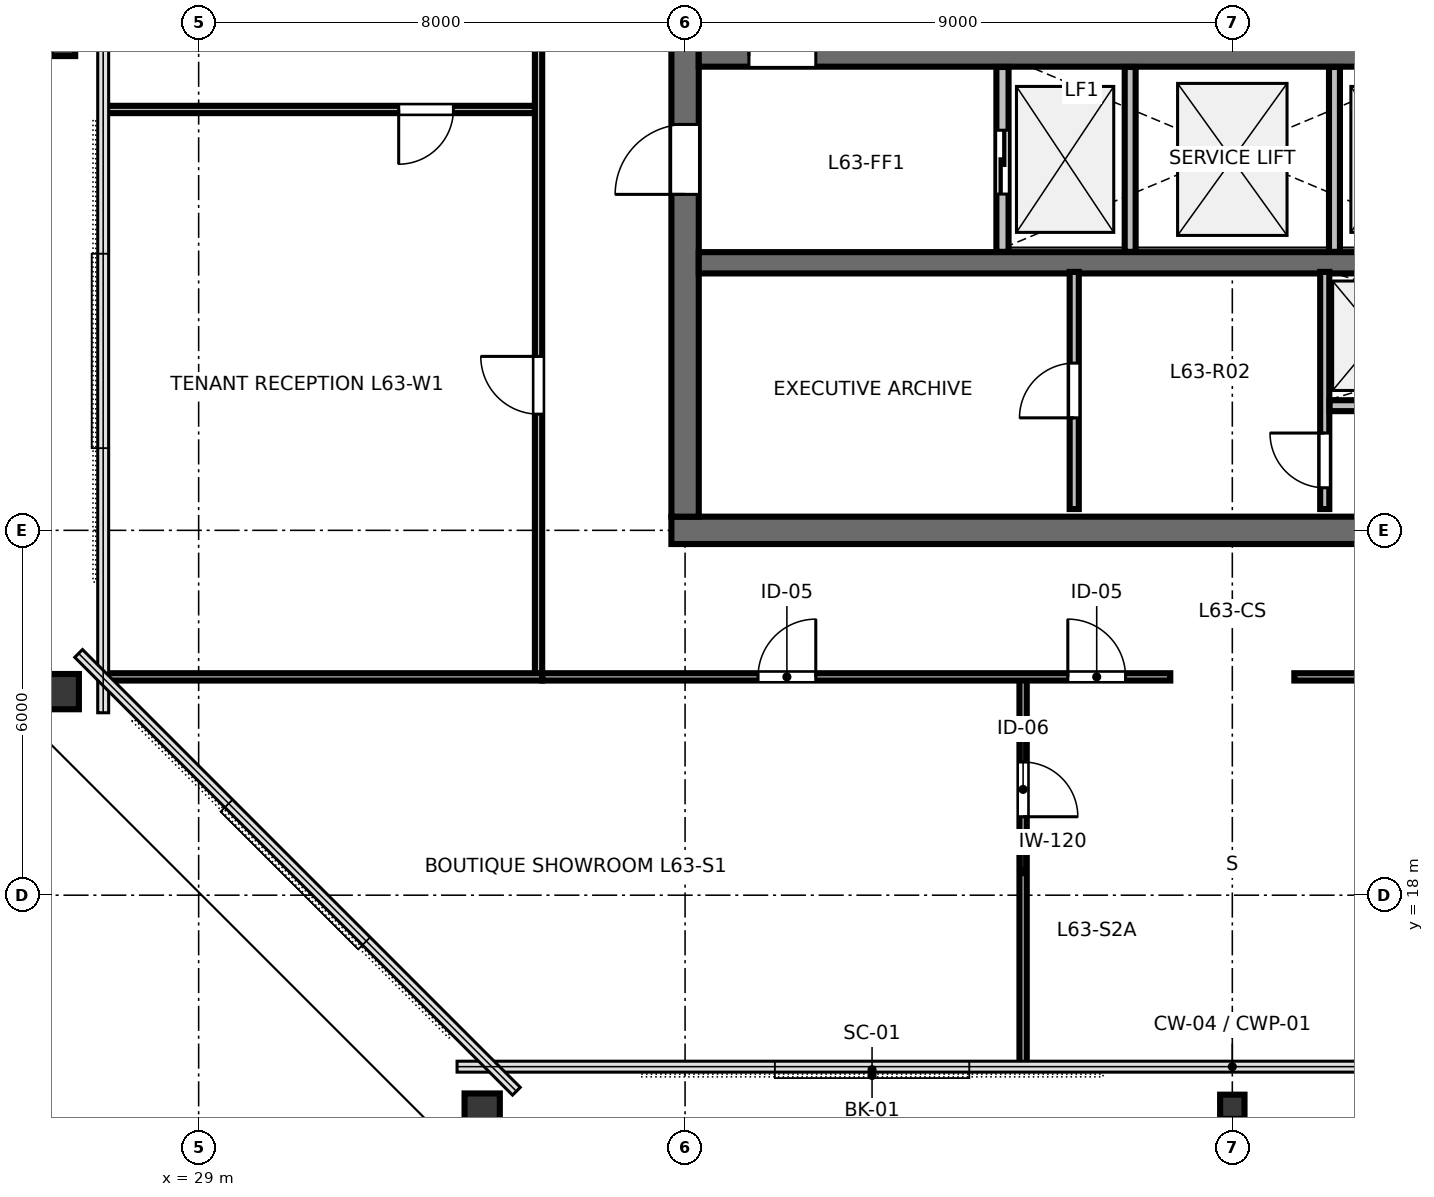
"""IFC4 building model, lengths in metres.
Left out: names, types, materials, properties, quantities, classifications, styles, units other than length and angle.
Written with IfcOpenShell. Run it as: python <this file> out.ifc"""

import sys

from ifc_helpers import new_model, si_unit, direction, frame, frame_2d, origin, origin_2d, place, context, subcontext, project, spatial, rectangle, hollow_rectangle, i_section, extrude, element, fill, save


model = new_model("IFC4")
c1 = context("Model", 3, precision=1e-05, world=origin(), true_north=direction((0.0, 1.0)))
c2 = subcontext(c1, "Body", "Model", "MODEL_VIEW")
j1 = project(units=[si_unit("LENGTHUNIT", "METRE"), si_unit("PLANEANGLEUNIT", "RADIAN")], contexts=[c1])
p1 = place(None, origin())
s1 = spatial("IfcSite", under=j1, at=p1, CompositionType="ELEMENT")
p2 = place(p1, origin())
s2 = spatial("IfcBuilding", under=s1, at=p2, CompositionType="ELEMENT")
p3 = place(p2, frame((0.0, 0.0, 239.4)))
s3 = spatial("IfcBuildingStorey", under=s2, at=p3, CompositionType="ELEMENT", Elevation=239.4)
p4 = place(p3, frame((36.775, 24.0, 0.0), z_axis=(0.0, 0.0, 1.0), x_axis=(1.0, 0.0, 0.0)))
e1 = element("IfcWall", 1, at=p4, inside=s3, PredefinedType="SHEAR", context=c2, shape_type="SweptSolid", body=[
    extrude(rectangle(XDim=18.45, YDim=0.45, at=frame_2d((9.225, 0.0))), origin(), (0.0, 0.0, 1.0), 3.36),
])
p5 = place(p4, frame((13.425, 0.0, 0.0)))
e2 = element("IfcOpeningElement", 2, at=p5, cuts=e1, PredefinedType="OPENING", context=c2, shape_type="SweptSolid", body=[
    extrude(rectangle(XDim=1.6, YDim=2.15, at=frame_2d((0.8, 1.075))), frame((0.0, 0.235, 0.0), z_axis=(0.0, -1.0, 0.0), x_axis=(1.0, 0.0, 0.0)), (0.0, 0.0, 1.0), 0.47),
])
p6 = place(p3, frame((37.0, 24.225, 0.0), z_axis=(0.0, 0.0, 1.0), x_axis=(0.0, 1.0, 0.0)))
e3 = element("IfcWall", 3, at=p6, inside=s3, PredefinedType="SHEAR", context=c2, shape_type="SweptSolid", body=[
    extrude(rectangle(XDim=15.55, YDim=0.45, at=frame_2d((7.775, 0.0))), origin(), (0.0, 0.0, 1.0), 3.36),
])
p7 = place(p6, frame((5.3, 0.0, 0.0)))
e4 = element("IfcOpeningElement", 4, at=p7, cuts=e3, PredefinedType="OPENING", context=c2, shape_type="SweptSolid", body=[
    extrude(rectangle(XDim=1.15, YDim=2.15, at=frame_2d((0.575, 1.075))), frame((0.0, 0.235, 0.0), z_axis=(0.0, -1.0, 0.0), x_axis=(1.0, 0.0, 0.0)), (0.0, 0.0, 1.0), 0.47),
])
p8 = place(p3, frame((37.225, 31.8, 0.0), z_axis=(0.0, 0.0, 1.0), x_axis=(1.0, 0.0, 0.0)))
e5 = element("IfcWall", 5, at=p8, inside=s3, PredefinedType="SHEAR", context=c2, shape_type="SweptSolid", body=[
    extrude(rectangle(XDim=17.55, YDim=0.35, at=frame_2d((8.775, 0.0))), origin(), (0.0, 0.0, 1.0), 3.36),
])
p9 = place(p8, frame((0.825, 0.0, 0.0)))
e6 = element("IfcOpeningElement", 6, at=p9, cuts=e5, PredefinedType="OPENING", context=c2, shape_type="SweptSolid", body=[
    extrude(rectangle(XDim=1.1, YDim=2.15, at=frame_2d((0.55, 1.075))), frame((0.0, 0.185, 0.0), z_axis=(0.0, -1.0, 0.0), x_axis=(1.0, 0.0, 0.0)), (0.0, 0.0, 1.0), 0.37),
])
p10 = place(p8, frame((14.725, 0.0, 0.0)))
e7 = element("IfcOpeningElement", 7, at=p10, cuts=e5, PredefinedType="OPENING", context=c2, shape_type="SweptSolid", body=[
    extrude(rectangle(XDim=1.1, YDim=2.15, at=frame_2d((0.55, 1.075))), frame((0.0, 0.185, 0.0), z_axis=(0.0, -1.0, 0.0), x_axis=(1.0, 0.0, 0.0)), (0.0, 0.0, 1.0), 0.37),
])
p11 = place(p3, frame((37.225, 28.4, 0.0), z_axis=(0.0, 0.0, 1.0), x_axis=(1.0, 0.0, 0.0)))
e8 = element("IfcWall", 8, at=p11, inside=s3, PredefinedType="SHEAR", context=c2, shape_type="SweptSolid", body=[
    extrude(rectangle(XDim=17.55, YDim=0.35, at=frame_2d((8.775, 0.0))), origin(), (0.0, 0.0, 1.0), 3.36),
])
p12 = place(p3, frame((33.663, 14.39, 0.0), z_axis=(0.0, 0.0, 1.0), x_axis=(1.0, 0.0, 0.0)))
e9 = element("IfcColumn", 9, at=p12, inside=s3, PredefinedType="COLUMN", context=c2, shape_type="SweptSolid", body=[
    extrude(hollow_rectangle(XDim=0.58, YDim=0.7, WallThickness=0.032, at=origin_2d()), origin(), (0.0, 0.0, 1.0), 3.373),
])
for number, where, z_axis, x_axis in (
    (10, (46.0, 14.52, 0.0), (0.0, 0.0, 1.0), (1.0, 0.0, 0.0)),
    (11, (26.77, 32.0, 0.0), (0.0, 0.0, 1.0), (0.0, 1.0, 0.0)),
):
    element("IfcColumn", number, at=place(p3, frame(where, z_axis=z_axis, x_axis=x_axis)), inside=s3, PredefinedType="COLUMN", context=c2, shape_type="SweptSolid", body=[
        extrude(i_section(OverallWidth=0.401, OverallDepth=0.399, WebThickness=0.025, FlangeThickness=0.04, FilletRadius=0.025, at=origin_2d()), origin(), (0.0, 0.0, 1.0), 3.373),
    ])
p13 = place(p3, frame((26.68, 21.348, 0.0), z_axis=(0.0, 0.0, 1.0), x_axis=(0.0, 1.0, 0.0)))
e12 = element("IfcColumn", 12, at=p13, inside=s3, PredefinedType="COLUMN", context=c2, shape_type="SweptSolid", body=[
    extrude(hollow_rectangle(XDim=0.58, YDim=0.7, WallThickness=0.032, at=origin_2d()), origin(), (0.0, 0.0, 1.0), 3.373),
])
p14 = place(p3, frame((42.22, 28.58, 0.0), z_axis=(0.0, 0.0, 1.0), x_axis=(0.0, 1.0, 0.0)))
e13 = element("IfcWall", 13, at=p14, inside=s3, PredefinedType="PARTITIONING", context=c2, shape_type="SweptSolid", body=[
    extrude(rectangle(XDim=3.04, YDim=0.2, at=frame_2d((1.52, 0.0))), origin(), (0.0, 0.0, 1.0), 3.375),
])
p15 = place(p14, frame((0.95, 0.0, 0.0)))
e14 = element("IfcOpeningElement", 14, at=p15, cuts=e13, PredefinedType="OPENING", context=c2, shape_type="SweptSolid", body=[
    extrude(rectangle(XDim=1.05, YDim=2.15, at=frame_2d((0.525, 1.075))), frame((0.0, 0.11, 0.0), z_axis=(0.0, -1.0, 0.0), x_axis=(1.0, 0.0, 0.0)), (0.0, 0.0, 1.0), 0.22),
])
for number, where, z_axis, x_axis in (
    (15, (44.32, 28.58, 0.0), (0.0, 0.0, 1.0), (0.0, 1.0, 0.0)),
    (16, (47.68, 28.58, 0.0), (0.0, 0.0, 1.0), (0.0, 1.0, 0.0)),
):
    element("IfcWall", number, at=place(p3, frame(where, z_axis=z_axis, x_axis=x_axis)), inside=s3, PredefinedType="PARTITIONING", context=c2, shape_type="SweptSolid", body=[
        extrude(rectangle(XDim=3.04, YDim=0.18, at=frame_2d((1.52, 0.0))), origin(), (0.0, 0.0, 1.0), 3.375),
    ])
p16 = place(p3, frame((43.4, 24.35, 0.0), z_axis=(0.0, 0.0, 1.0), x_axis=(0.0, 1.0, 0.0)))
e17 = element("IfcWall", 17, at=p16, inside=s3, PredefinedType="PARTITIONING", context=c2, shape_type="SweptSolid", body=[
    extrude(rectangle(XDim=3.9, YDim=0.15, at=frame_2d((1.95, 0.0))), origin(), (0.0, 0.0, 1.0), 3.375),
])
p17 = place(p16, frame((1.5, 0.0, 0.0)))
e18 = element("IfcOpeningElement", 18, at=p17, cuts=e17, PredefinedType="OPENING", context=c2, shape_type="SweptSolid", body=[
    extrude(rectangle(XDim=0.9, YDim=2.15, at=frame_2d((0.45, 1.075))), frame((0.0, 0.085, 0.0), z_axis=(0.0, -1.0, 0.0), x_axis=(1.0, 0.0, 0.0)), (0.0, 0.0, 1.0), 0.17),
])
p18 = place(p3, frame((47.52, 24.35, 0.0), z_axis=(0.0, 0.0, 1.0), x_axis=(0.0, 1.0, 0.0)))
e19 = element("IfcWall", 19, at=p18, inside=s3, PredefinedType="PARTITIONING", context=c2, shape_type="SweptSolid", body=[
    extrude(rectangle(XDim=3.9, YDim=0.15, at=frame_2d((1.95, 0.0))), origin(), (0.0, 0.0, 1.0), 3.375),
])
p19 = place(p18, frame((0.35, 0.0, 0.0)))
e20 = element("IfcOpeningElement", 20, at=p19, cuts=e19, PredefinedType="OPENING", context=c2, shape_type="SweptSolid", body=[
    extrude(rectangle(XDim=0.9, YDim=2.15, at=frame_2d((0.45, 1.075))), frame((0.0, 0.085, 0.0), z_axis=(0.0, -1.0, 0.0), x_axis=(1.0, 0.0, 0.0)), (0.0, 0.0, 1.0), 0.17),
])
p20 = place(p3, frame((47.6, 26.05, 0.0), z_axis=(0.0, 0.0, 1.0), x_axis=(1.0, 0.0, 0.0)))
e21 = element("IfcWall", 21, at=p20, inside=s3, PredefinedType="PARTITIONING", context=c2, shape_type="SweptSolid", body=[
    extrude(rectangle(XDim=7.0, YDim=0.18, at=frame_2d((3.5, 0.0))), origin(), (0.0, 0.0, 1.0), 3.375),
])
p21 = place(p20, frame((1.2, 0.0, 0.0)))
e22 = element("IfcOpeningElement", 22, at=p21, cuts=e21, PredefinedType="OPENING", context=c2, shape_type="SweptSolid", body=[
    extrude(rectangle(XDim=1.05, YDim=2.15, at=frame_2d((0.525, 1.075))), frame((0.0, 0.1, 0.0), z_axis=(0.0, -1.0, 0.0), x_axis=(1.0, 0.0, 0.0)), (0.0, 0.0, 1.0), 0.2),
])
p22 = place(p20, frame((3.4, 0.0, 0.0)))
e23 = element("IfcOpeningElement", 23, at=p22, cuts=e21, PredefinedType="OPENING", context=c2, shape_type="SweptSolid", body=[
    extrude(rectangle(XDim=1.05, YDim=2.15, at=frame_2d((0.525, 1.075))), frame((0.0, 0.1, 0.0), z_axis=(0.0, -1.0, 0.0), x_axis=(1.0, 0.0, 0.0)), (0.0, 0.0, 1.0), 0.2),
])
p23 = place(p3, frame((42.559, 21.59, 0.0), z_axis=(0.0, 0.0, 1.0), x_axis=(0.0, -1.0, 0.0)))
e24 = element("IfcWall", 24, at=p23, inside=s3, PredefinedType="PARTITIONING", context=c2, shape_type="SweptSolid", body=[
    extrude(rectangle(XDim=6.41, YDim=0.12, at=frame_2d((3.205, 0.0))), origin(), (0.0, 0.0, 1.0), 2.655),
])
p24 = place(p23, frame((1.4, 0.0, 0.0)))
e25 = element("IfcOpeningElement", 25, at=p24, cuts=e24, PredefinedType="OPENING", context=c2, shape_type="SweptSolid", body=[
    extrude(rectangle(XDim=0.9, YDim=2.15, at=frame_2d((0.45, 1.075))), frame((0.0, 0.07, 0.0), z_axis=(0.0, -1.0, 0.0), x_axis=(1.0, 0.0, 0.0)), (0.0, 0.0, 1.0), 0.14),
])
p25 = place(p3, frame((34.65, 21.59, 0.0), z_axis=(0.0, 0.0, 1.0), x_axis=(1.0, 0.0, 0.0)))
e26 = element("IfcWall", 26, at=p25, inside=s3, PredefinedType="PARTITIONING", context=c2, shape_type="SweptSolid", body=[
    extrude(rectangle(XDim=10.33, YDim=0.12, at=frame_2d((5.165, 0.0))), origin(), (0.0, 0.0, 1.0), 2.655),
])
p26 = place(p25, frame((3.55, 0.0, 0.0)))
e27 = element("IfcOpeningElement", 27, at=p26, cuts=e26, PredefinedType="OPENING", context=c2, shape_type="SweptSolid", body=[
    extrude(rectangle(XDim=0.95, YDim=2.15, at=frame_2d((0.475, 1.075))), frame((0.0, 0.07, 0.0), z_axis=(0.0, -1.0, 0.0), x_axis=(1.0, 0.0, 0.0)), (0.0, 0.0, 1.0), 0.14),
])
p27 = place(p25, frame((8.645, 0.0, 0.0)))
e28 = element("IfcOpeningElement", 28, at=p27, cuts=e26, PredefinedType="OPENING", context=c2, shape_type="SweptSolid", body=[
    extrude(rectangle(XDim=0.95, YDim=2.15, at=frame_2d((0.475, 1.075))), frame((0.0, 0.07, 0.0), z_axis=(0.0, -1.0, 0.0), x_axis=(1.0, 0.0, 0.0)), (0.0, 0.0, 1.0), 0.14),
])
p28 = place(p3, frame((47.02, 21.59, 0.0), z_axis=(0.0, 0.0, 1.0), x_axis=(1.0, 0.0, 0.0)))
e29 = element("IfcWall", 29, at=p28, inside=s3, PredefinedType="PARTITIONING", context=c2, shape_type="SweptSolid", body=[
    extrude(rectangle(XDim=10.33, YDim=0.12, at=frame_2d((5.165, 0.0))), origin(), (0.0, 0.0, 1.0), 2.655),
])
p29 = place(p28, frame((4.62, 0.0, 0.0)))
e30 = element("IfcOpeningElement", 30, at=p29, cuts=e29, PredefinedType="OPENING", context=c2, shape_type="SweptSolid", body=[
    extrude(rectangle(XDim=0.95, YDim=2.15, at=frame_2d((0.475, 1.075))), frame((0.0, 0.07, 0.0), z_axis=(0.0, -1.0, 0.0), x_axis=(1.0, 0.0, 0.0)), (0.0, 0.0, 1.0), 0.14),
])
p30 = place(p3, frame((34.59, 30.921, 0.0), z_axis=(0.0, 0.0, 1.0), x_axis=(-1.0, 0.0, 0.0)))
e31 = element("IfcWall", 31, at=p30, inside=s3, PredefinedType="PARTITIONING", context=c2, shape_type="SweptSolid", body=[
    extrude(rectangle(XDim=7.16, YDim=0.12, at=frame_2d((3.58, 0.0))), origin(), (0.0, 0.0, 1.0), 2.655),
])
p31 = place(p30, frame((1.4, 0.0, 0.0)))
e32 = element("IfcOpeningElement", 32, at=p31, cuts=e31, PredefinedType="OPENING", context=c2, shape_type="SweptSolid", body=[
    extrude(rectangle(XDim=0.9, YDim=2.15, at=frame_2d((0.45, 1.075))), frame((0.0, 0.07, 0.0), z_axis=(0.0, -1.0, 0.0), x_axis=(1.0, 0.0, 0.0)), (0.0, 0.0, 1.0), 0.14),
])
p32 = place(p3, frame((34.59, 21.65, 0.0), z_axis=(0.0, 0.0, 1.0), x_axis=(0.0, 1.0, 0.0)))
e33 = element("IfcWall", 33, at=p32, inside=s3, PredefinedType="PARTITIONING", context=c2, shape_type="SweptSolid", body=[
    extrude(rectangle(XDim=20.7, YDim=0.12, at=frame_2d((10.35, 0.0))), origin(), (0.0, 0.0, 1.0), 2.655),
])
p33 = place(p32, frame((4.26, 0.0, 0.0)))
e34 = element("IfcOpeningElement", 34, at=p33, cuts=e33, PredefinedType="OPENING", context=c2, shape_type="SweptSolid", body=[
    extrude(rectangle(XDim=0.95, YDim=2.15, at=frame_2d((0.475, 1.075))), frame((0.0, 0.07, 0.0), z_axis=(0.0, -1.0, 0.0), x_axis=(1.0, 0.0, 0.0)), (0.0, 0.0, 1.0), 0.14),
])
p34 = place(p32, frame((14.411, 0.0, 0.0)))
e35 = element("IfcOpeningElement", 35, at=p34, cuts=e33, PredefinedType="OPENING", context=c2, shape_type="SweptSolid", body=[
    extrude(rectangle(XDim=0.95, YDim=2.15, at=frame_2d((0.475, 1.075))), frame((0.0, 0.07, 0.0), z_axis=(0.0, -1.0, 0.0), x_axis=(1.0, 0.0, 0.0)), (0.0, 0.0, 1.0), 0.14),
])
p35 = place(p3, frame((34.65, 21.59, 0.0), z_axis=(0.0, 0.0, 1.0), x_axis=(-1.0, 0.0, 0.0)))
e36 = element("IfcWall", 36, at=p35, inside=s3, PredefinedType="PARTITIONING", context=c2, shape_type="SweptSolid", body=[
    extrude(rectangle(XDim=7.22, YDim=0.12, at=frame_2d((3.61, 0.0))), origin(), (0.0, 0.0, 1.0), 2.655),
])
p36 = place(p9, origin())
e37 = element("IfcDoor", 37, at=p36, inside=s3, OperationType="SINGLE_SWING_LEFT", PredefinedType="DOOR", context=c2, shape_type="SweptSolid", body=[
    extrude(rectangle(XDim=1.1, YDim=2.15, at=frame_2d((0.55, 1.075))), frame((0.0, 0.025, 0.0), z_axis=(0.0, -1.0, 0.0), x_axis=(1.0, 0.0, 0.0)), (0.0, 0.0, 1.0), 0.05),
])
fill(e6, e37)
p37 = place(p7, origin())
e38 = element("IfcDoor", 38, at=p37, inside=s3, OperationType="SINGLE_SWING_LEFT", PredefinedType="DOOR", context=c2, shape_type="SweptSolid", body=[
    extrude(rectangle(XDim=1.15, YDim=2.15, at=frame_2d((0.575, 1.075))), frame((0.0, 0.025, 0.0), z_axis=(0.0, -1.0, 0.0), x_axis=(1.0, 0.0, 0.0)), (0.0, 0.0, 1.0), 0.05),
])
fill(e4, e38)
p38 = place(p15, origin())
e39 = element("IfcDoor", 39, at=p38, inside=s3, OperationType="SLIDING_TO_LEFT", PredefinedType="DOOR", context=c2, shape_type="SweptSolid", body=[
    extrude(rectangle(XDim=1.05, YDim=2.15, at=frame_2d((0.525, 1.075))), frame((0.0, 0.025, 0.0), z_axis=(0.0, -1.0, 0.0), x_axis=(1.0, 0.0, 0.0)), (0.0, 0.0, 1.0), 0.05),
])
fill(e14, e39)
p39 = place(p17, origin())
e40 = element("IfcDoor", 40, at=p39, inside=s3, OperationType="SINGLE_SWING_LEFT", PredefinedType="DOOR", context=c2, shape_type="SweptSolid", body=[
    extrude(rectangle(XDim=0.9, YDim=2.15, at=frame_2d((0.45, 1.075))), frame((0.0, 0.025, 0.0), z_axis=(0.0, -1.0, 0.0), x_axis=(1.0, 0.0, 0.0)), (0.0, 0.0, 1.0), 0.05),
])
fill(e18, e40)
p40 = place(p19, origin())
e41 = element("IfcDoor", 41, at=p40, inside=s3, OperationType="SINGLE_SWING_RIGHT", PredefinedType="DOOR", context=c2, shape_type="SweptSolid", body=[
    extrude(rectangle(XDim=0.9, YDim=2.15, at=frame_2d((0.45, 1.075))), frame((0.0, 0.025, 0.0), z_axis=(0.0, -1.0, 0.0), x_axis=(1.0, 0.0, 0.0)), (0.0, 0.0, 1.0), 0.05),
])
fill(e20, e41)
p41 = place(p24, origin())
e42 = element("IfcDoor", 42, at=p41, inside=s3, OperationType="SINGLE_SWING_RIGHT", PredefinedType="DOOR", context=c2, shape_type="SweptSolid", body=[
    extrude(rectangle(XDim=0.9, YDim=2.15, at=frame_2d((0.45, 1.075))), frame((0.0, 0.025, 0.0), z_axis=(0.0, -1.0, 0.0), x_axis=(1.0, 0.0, 0.0)), (0.0, 0.0, 1.0), 0.05),
])
fill(e25, e42)
p42 = place(p26, origin())
e43 = element("IfcDoor", 43, at=p42, inside=s3, OperationType="SINGLE_SWING_RIGHT", PredefinedType="DOOR", context=c2, shape_type="SweptSolid", body=[
    extrude(rectangle(XDim=0.95, YDim=2.15, at=frame_2d((0.475, 1.075))), frame((0.0, 0.025, 0.0), z_axis=(0.0, -1.0, 0.0), x_axis=(1.0, 0.0, 0.0)), (0.0, 0.0, 1.0), 0.05),
])
fill(e27, e43)
p43 = place(p27, origin())
e44 = element("IfcDoor", 44, at=p43, inside=s3, OperationType="SINGLE_SWING_LEFT", PredefinedType="DOOR", context=c2, shape_type="SweptSolid", body=[
    extrude(rectangle(XDim=0.95, YDim=2.15, at=frame_2d((0.475, 1.075))), frame((0.0, 0.025, 0.0), z_axis=(0.0, -1.0, 0.0), x_axis=(1.0, 0.0, 0.0)), (0.0, 0.0, 1.0), 0.05),
])
fill(e28, e44)
p44 = place(p31, origin())
e45 = element("IfcDoor", 45, at=p44, inside=s3, OperationType="SINGLE_SWING_RIGHT", PredefinedType="DOOR", context=c2, shape_type="SweptSolid", body=[
    extrude(rectangle(XDim=0.9, YDim=2.15, at=frame_2d((0.45, 1.075))), frame((0.0, 0.025, 0.0), z_axis=(0.0, -1.0, 0.0), x_axis=(1.0, 0.0, 0.0)), (0.0, 0.0, 1.0), 0.05),
])
fill(e32, e45)
p45 = place(p33, origin())
e46 = element("IfcDoor", 46, at=p45, inside=s3, OperationType="SINGLE_SWING_RIGHT", PredefinedType="DOOR", context=c2, shape_type="SweptSolid", body=[
    extrude(rectangle(XDim=0.95, YDim=2.15, at=frame_2d((0.475, 1.075))), frame((0.0, 0.025, 0.0), z_axis=(0.0, -1.0, 0.0), x_axis=(1.0, 0.0, 0.0)), (0.0, 0.0, 1.0), 0.05),
])
fill(e34, e46)
save(model, sys.argv[1])
